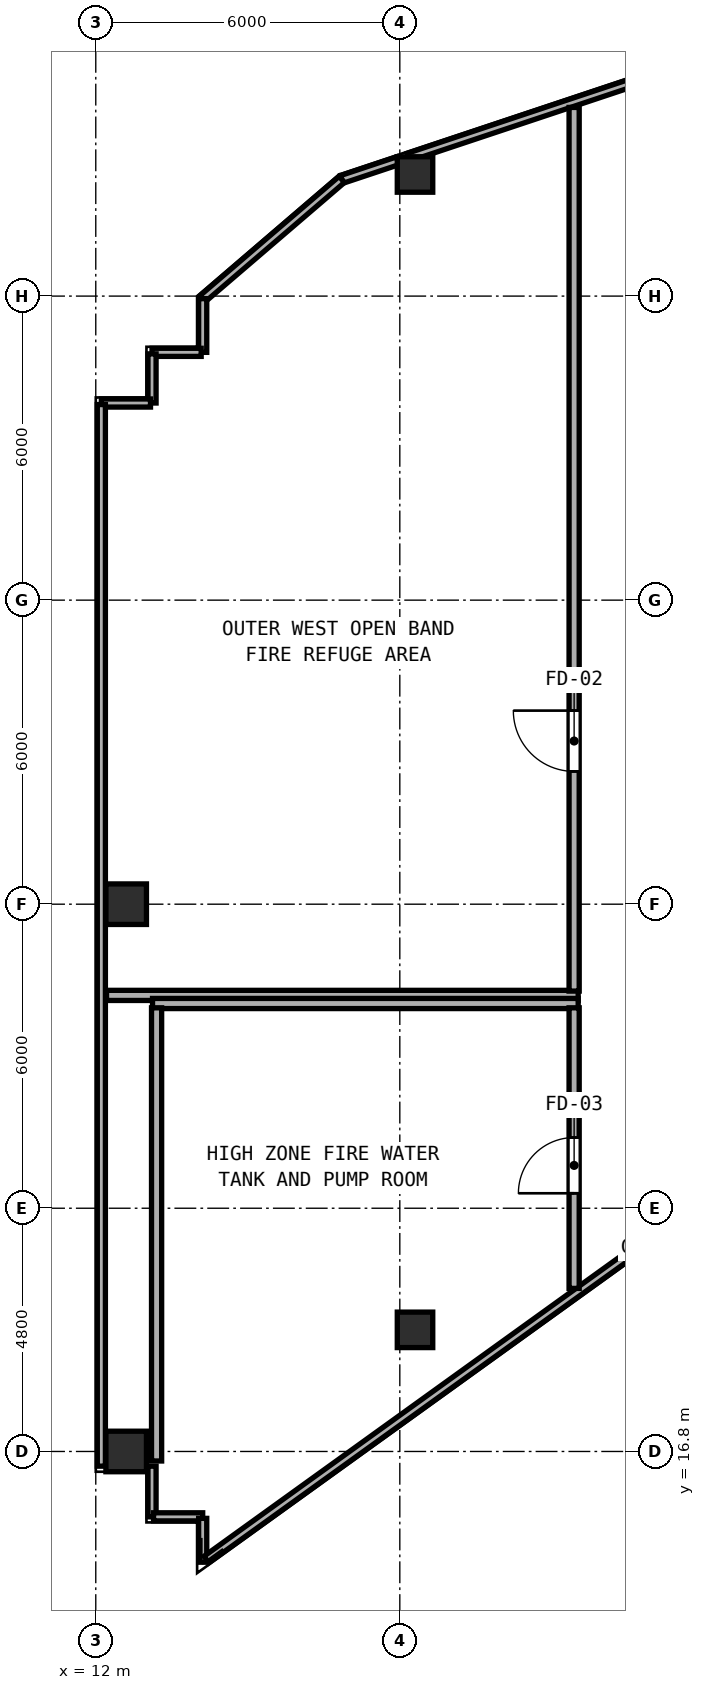
"""IFC4 building model, lengths in metres.
Left out: names, types, materials, properties, quantities, classifications, styles, units other than length and angle.
Written with IfcOpenShell. Run it as: python <this file> out.ifc"""

import sys

from ifc_helpers import new_model, si_unit, direction, frame, frame_2d, origin, origin_2d, place, context, subcontext, project, spatial, rectangle, hollow_rectangle, extrude, element, fill, save


model = new_model("IFC4")
c1 = context("Model", 3, precision=1e-05, world=origin(), true_north=direction((0.0, 1.0)))
c2 = subcontext(c1, "Body", "Model", "MODEL_VIEW")
j1 = project(units=[si_unit("LENGTHUNIT", "METRE"), si_unit("PLANEANGLEUNIT", "RADIAN")], contexts=[c1])
p1 = place(None, origin())
s1 = spatial("IfcSite", under=j1, at=p1, CompositionType="ELEMENT")
p2 = place(p1, origin())
s2 = spatial("IfcBuilding", under=s1, at=p2, CompositionType="ELEMENT")
p3 = place(p2, frame((0.0, 0.0, 277.55)))
s3 = spatial("IfcBuildingStorey", under=s2, at=p3, CompositionType="ELEMENT", Elevation=277.55)
for number, where, z_axis, x_axis in (
    (1, (12.6, 16.8, 0.0), (0.0, 0.0, 1.0), (1.0, 0.0, 0.0)),
    (2, (12.6, 27.6, 0.0), (0.0, 0.0, 1.0), (1.0, 0.0, 0.0)),
):
    element("IfcColumn", number, at=place(p3, frame(where, z_axis=z_axis, x_axis=x_axis)), inside=s3, PredefinedType="COLUMN", context=c2, shape_type="SweptSolid", body=[
        extrude(hollow_rectangle(XDim=0.8, YDim=0.8, WallThickness=0.03, at=origin_2d()), origin(), (0.0, 0.0, 1.0), 4.65),
    ])
for number, where, z_axis, x_axis in (
    (3, (18.3, 19.2, 0.0), (0.0, 0.0, 1.0), (1.0, 0.0, 0.0)),
    (4, (18.3, 42.0, 0.0), (0.0, 0.0, 1.0), (1.0, 0.0, 0.0)),
):
    element("IfcColumn", number, at=place(p3, frame(where, z_axis=z_axis, x_axis=x_axis)), inside=s3, PredefinedType="COLUMN", context=c2, shape_type="SweptSolid", body=[
        extrude(hollow_rectangle(XDim=0.7, YDim=0.7, WallThickness=0.026, at=origin_2d()), origin(), (0.0, 0.0, 1.0), 4.65),
    ])
p4 = place(p3, frame((24.082, 44.311, 0.0), z_axis=(0.0, 0.0, 1.0), x_axis=(-0.948687218335, -0.316216004921, 0.0)))
e5 = element("IfcWall", 5, at=p4, inside=s3, PredefinedType="PARAPET", context=c2, shape_type="SweptSolid", body=[
    extrude(rectangle(XDim=6.228, YDim=0.16, at=frame_2d((3.114, 0.0))), origin(), (0.0, 0.0, 1.0), 1.15),
])
p5 = place(p3, frame((17.958, 42.27, 0.0), z_axis=(0.0, 0.0, 1.0), x_axis=(-0.948725296556, -0.316101742599, 0.0)))
e6 = element("IfcWall", 6, at=p5, inside=s3, PredefinedType="PARAPET", context=c2, shape_type="SweptSolid", body=[
    extrude(rectangle(XDim=1.162, YDim=0.16, at=frame_2d((0.581, 0.0))), origin(), (0.0, 0.0, 1.0), 1.15),
])
p6 = place(p3, frame((16.855, 41.903, 0.0), z_axis=(0.0, 0.0, 1.0), x_axis=(-0.759213704594, -0.650841417518, 0.0)))
e7 = element("IfcWall", 7, at=p6, inside=s3, PredefinedType="PARAPET", context=c2, shape_type="SweptSolid", body=[
    extrude(rectangle(XDim=3.616, YDim=0.16, at=frame_2d((1.808, 0.0))), origin(), (0.0, 0.0, 1.0), 1.15),
])
p7 = place(p3, frame((14.11, 39.549, 0.0), z_axis=(0.0, 0.0, 1.0), x_axis=(0.0, -1.0, 0.0)))
e8 = element("IfcWall", 8, at=p7, inside=s3, PredefinedType="PARAPET", context=c2, shape_type="SweptSolid", body=[
    extrude(rectangle(XDim=1.059, YDim=0.16, at=frame_2d((0.53, 0.0))), origin(), (0.0, 0.0, 1.0), 1.15),
])
for number, where, z_axis, x_axis in (
    (9, (14.08, 38.49, 0.0), (0.0, 0.0, 1.0), (-1.0, 0.0, 0.0)),
    (10, (13.11, 38.46, 0.0), (0.0, 0.0, 1.0), (0.0, -1.0, 0.0)),
    (11, (13.08, 37.49, 0.0), (0.0, 0.0, 1.0), (-1.0, 0.0, 0.0)),
):
    element("IfcWall", number, at=place(p3, frame(where, z_axis=z_axis, x_axis=x_axis)), inside=s3, PredefinedType="PARAPET", context=c2, shape_type="SweptSolid", body=[
        extrude(rectangle(XDim=0.97, YDim=0.16, at=frame_2d((0.485, 0.0))), origin(), (0.0, 0.0, 1.0), 1.15),
    ])
p8 = place(p3, frame((12.11, 37.46, 0.0), z_axis=(0.0, 0.0, 1.0), x_axis=(0.0, -1.0, 0.0)))
e12 = element("IfcWall", 12, at=p8, inside=s3, PredefinedType="PARAPET", context=c2, shape_type="SweptSolid", body=[
    extrude(rectangle(XDim=20.95, YDim=0.16, at=frame_2d((10.475, 0.0))), origin(), (0.0, 0.0, 1.0), 1.15),
])
p9 = place(p3, frame((13.11, 16.51, 0.0), z_axis=(0.0, 0.0, 1.0), x_axis=(0.0, -1.0, 0.0)))
e13 = element("IfcWall", 13, at=p9, inside=s3, PredefinedType="PARAPET", context=c2, shape_type="SweptSolid", body=[
    extrude(rectangle(XDim=1.0, YDim=0.16, at=frame_2d((0.5, 0.0))), origin(), (0.0, 0.0, 1.0), 1.15),
])
p10 = place(p3, frame((13.14, 15.51, 0.0), z_axis=(0.0, 0.0, 1.0), x_axis=(1.0, 0.0, 0.0)))
e14 = element("IfcWall", 14, at=p10, inside=s3, PredefinedType="PARAPET", context=c2, shape_type="SweptSolid", body=[
    extrude(rectangle(XDim=0.97, YDim=0.16, at=frame_2d((0.485, 0.0))), origin(), (0.0, 0.0, 1.0), 1.15),
])
p11 = place(p3, frame((14.11, 15.48, 0.0), z_axis=(0.0, 0.0, 1.0), x_axis=(0.0, -1.0, 0.0)))
e15 = element("IfcWall", 15, at=p11, inside=s3, PredefinedType="PARAPET", context=c2, shape_type="SweptSolid", body=[
    extrude(rectangle(XDim=0.865, YDim=0.16, at=frame_2d((0.433, 0.0))), origin(), (0.0, 0.0, 1.0), 1.15),
])
p12 = place(p3, frame((14.183, 14.667, 0.0), z_axis=(0.0, 0.0, 1.0), x_axis=(0.811523176966, 0.584320231762, 0.0)))
e16 = element("IfcWall", 16, at=p12, inside=s3, PredefinedType="PARAPET", context=c2, shape_type="SweptSolid", body=[
    extrude(rectangle(XDim=11.614, YDim=0.16, at=frame_2d((5.807, 0.0))), origin(), (0.0, 0.0, 1.0), 1.15),
])
p13 = place(p3, frame((12.212, 25.8, 0.0), z_axis=(0.0, 0.0, 1.0), x_axis=(1.0, 0.0, 0.0)))
e17 = element("IfcWall", 17, at=p13, inside=s3, PredefinedType="SOLIDWALL", context=c2, shape_type="SweptSolid", body=[
    extrude(rectangle(XDim=9.308, YDim=0.2, at=frame_2d((4.654, 0.0))), origin(), (0.0, 0.0, 1.0), 4.4),
])
p14 = place(p3, frame((21.44, 25.885, 0.0), z_axis=(0.0, 0.0, 1.0), x_axis=(0.0, 1.0, 0.0)))
e18 = element("IfcWall", 18, at=p14, inside=s3, PredefinedType="SOLIDWALL", context=c2, shape_type="SweptSolid", body=[
    extrude(rectangle(XDim=17.438, YDim=0.2, at=frame_2d((8.719, 0.0))), origin(), (0.0, 0.0, 1.0), 4.4),
])
p15 = place(p14, frame((5.535, 0.0, 0.0), z_axis=(0.0, 0.0, 1.0), x_axis=(-1.0, 0.0, 0.0)))
e19 = element("IfcOpeningElement", 19, at=p15, cuts=e18, PredefinedType="OPENING", context=c2, shape_type="SweptSolid", body=[
    extrude(rectangle(XDim=1.2, YDim=2.15, at=frame_2d((0.6, 1.075))), frame((0.0, 0.11, 0.0), z_axis=(0.0, -1.0, 0.0), x_axis=(1.0, 0.0, 0.0)), (0.0, 0.0, 1.0), 0.22),
])
p16 = place(p3, frame((13.12, 25.64, 0.0), z_axis=(0.0, 0.0, 1.0), x_axis=(1.0, 0.0, 0.0)))
e20 = element("IfcWall", 20, at=p16, inside=s3, PredefinedType="SOLIDWALL", context=c2, shape_type="SweptSolid", body=[
    extrude(rectangle(XDim=8.4, YDim=0.2, at=frame_2d((4.2, 0.0))), origin(), (0.0, 0.0, 1.0), 4.4),
])
p17 = place(p3, frame((13.2, 16.612, 0.0), z_axis=(0.0, 0.0, 1.0), x_axis=(0.0, 1.0, 0.0)))
e21 = element("IfcWall", 21, at=p17, inside=s3, PredefinedType="SOLIDWALL", context=c2, shape_type="SweptSolid", body=[
    extrude(rectangle(XDim=8.943, YDim=0.2, at=frame_2d((4.471, 0.0))), origin(), (0.0, 0.0, 1.0), 4.4),
])
p18 = place(p3, frame((21.44, 20.018, 0.0), z_axis=(0.0, 0.0, 1.0), x_axis=(0.0, 1.0, 0.0)))
e22 = element("IfcWall", 22, at=p18, inside=s3, PredefinedType="SOLIDWALL", context=c2, shape_type="SweptSolid", body=[
    extrude(rectangle(XDim=5.537, YDim=0.2, at=frame_2d((2.769, 0.0))), origin(), (0.0, 0.0, 1.0), 4.4),
])
p19 = place(p18, frame((2.977, 0.0, 0.0), z_axis=(0.0, 0.0, 1.0), x_axis=(-1.0, 0.0, 0.0)))
e23 = element("IfcOpeningElement", 23, at=p19, cuts=e22, PredefinedType="OPENING", context=c2, shape_type="SweptSolid", body=[
    extrude(rectangle(XDim=1.1, YDim=2.15, at=frame_2d((0.55, 1.075))), frame((0.0, 0.11, 0.0), z_axis=(0.0, -1.0, 0.0), x_axis=(1.0, 0.0, 0.0)), (0.0, 0.0, 1.0), 0.22),
])
p20 = place(p15, origin())
e24 = element("IfcDoor", 24, at=p20, inside=s3, OperationType="SINGLE_SWING_LEFT", PredefinedType="DOOR", context=c2, shape_type="SweptSolid", body=[
    extrude(rectangle(XDim=1.2, YDim=2.15, at=frame_2d((0.6, 1.075))), frame((0.0, 0.025, 0.0), z_axis=(0.0, -1.0, 0.0), x_axis=(1.0, 0.0, 0.0)), (0.0, 0.0, 1.0), 0.05),
])
fill(e19, e24)
p21 = place(p19, origin())
e25 = element("IfcDoor", 25, at=p21, inside=s3, OperationType="SINGLE_SWING_RIGHT", PredefinedType="DOOR", context=c2, shape_type="SweptSolid", body=[
    extrude(rectangle(XDim=1.1, YDim=2.15, at=frame_2d((0.55, 1.075))), frame((0.0, 0.025, 0.0), z_axis=(0.0, -1.0, 0.0), x_axis=(1.0, 0.0, 0.0)), (0.0, 0.0, 1.0), 0.05),
])
fill(e23, e25)
save(model, sys.argv[1])
